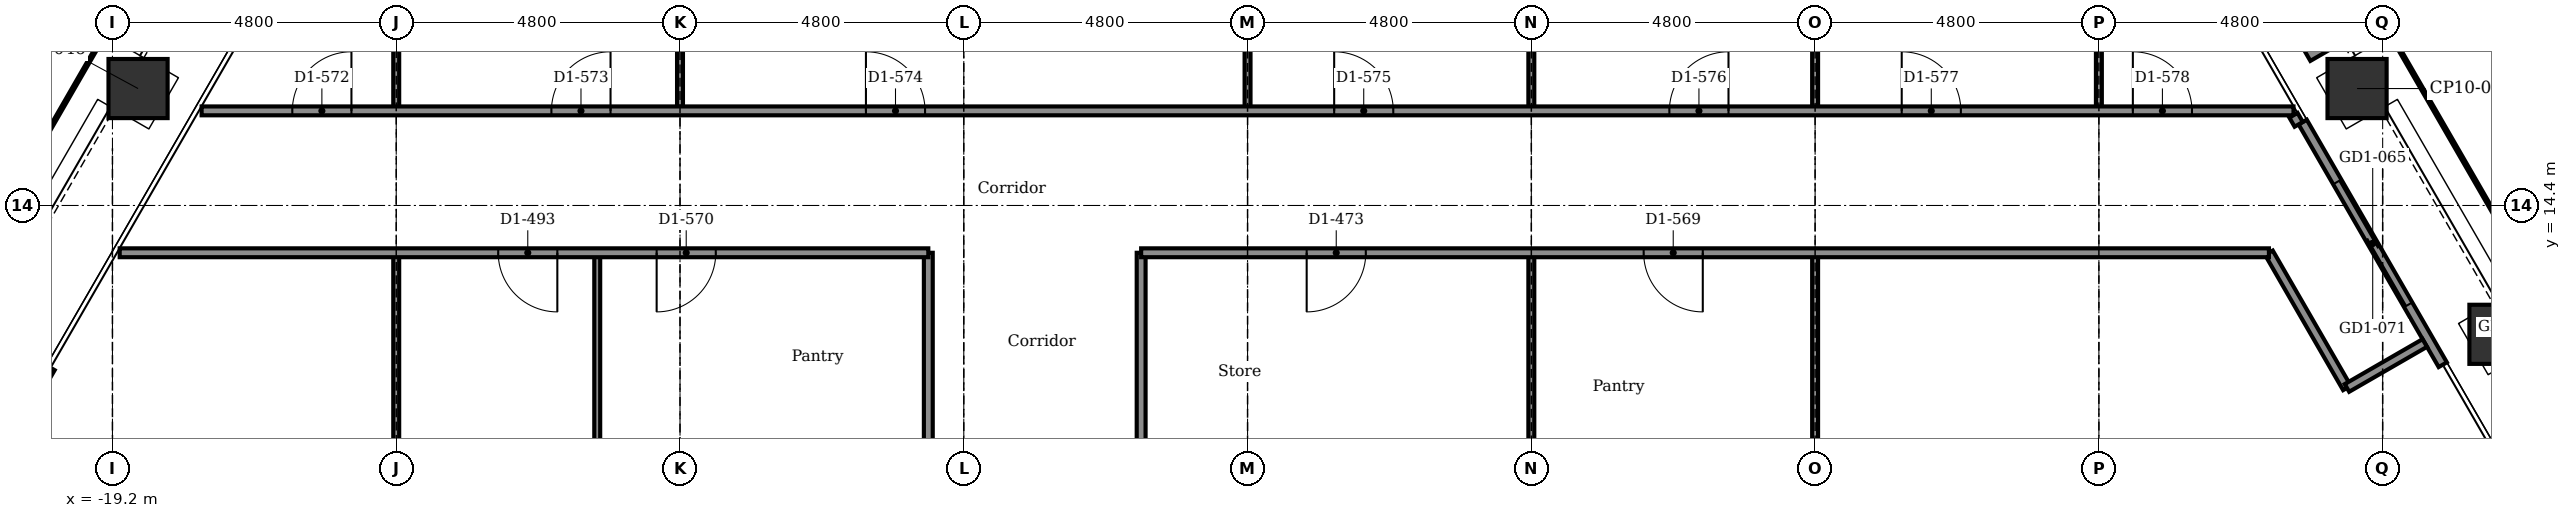
"""IFC4 building model, lengths in metres.
Left out: names, types, materials, properties, quantities, classifications, styles, units other than length and angle.
Written with IfcOpenShell. Run it as: python <this file> out.ifc"""

import sys

from ifc_helpers import new_model, si_unit, direction, frame, frame_2d, origin, origin_2d, place, context, subcontext, project, spatial, rectangle, extrude, element, fill, save


model = new_model("IFC4")
c1 = context("Model", 3, precision=1e-05, world=origin(), true_north=direction((0.0, 1.0)))
c2 = subcontext(c1, "Body", "Model", "MODEL_VIEW")
j1 = project(units=[si_unit("LENGTHUNIT", "METRE"), si_unit("PLANEANGLEUNIT", "RADIAN")], contexts=[c1])
p1 = place(None, origin())
s1 = spatial("IfcSite", under=j1, at=p1, CompositionType="ELEMENT")
p2 = place(p1, origin())
s2 = spatial("IfcBuilding", under=s1, at=p2, CompositionType="ELEMENT")
p3 = place(p2, frame((0.0, 0.0, 201.2)))
s3 = spatial("IfcBuildingStorey", under=s2, at=p3, CompositionType="ELEMENT", Elevation=201.2)
for number, where, z_axis, x_axis in (
    (1, (18.767, 16.378, -0.15), (0.0, 0.0, 1.0), (0.866, 0.5, 0.0)),
    (2, (21.167, 12.221, -0.15), (0.0, 0.0, 1.0), (0.866, 0.5, 0.0)),
    (3, (-18.767, 16.378, -0.15), (0.0, 0.0, 1.0), (0.5, 0.866, 0.0)),
):
    element("IfcColumn", number, at=place(p3, frame(where, z_axis=z_axis, x_axis=x_axis)), inside=s3, PredefinedType="COLUMN", context=c2, shape_type="SweptSolid", body=[
        extrude(rectangle(XDim=1.0, YDim=1.0, at=origin_2d()), origin(), (0.0, 0.0, 1.0), 3.9),
    ])
p4 = place(p3, frame((17.847, 15.812, 0.0), z_axis=(0.0, 0.0, 1.0), x_axis=(0.5000167099, -0.866015756104, 0.0)))
e4 = element("IfcWall", 4, at=p4, inside=s3, PredefinedType="PARTITIONING", context=c2, shape_type="SweptSolid", body=[
    extrude(rectangle(XDim=4.74, YDim=0.16, at=frame_2d((2.37, 0.0))), origin(), (0.0, 0.0, 1.0), 3.75),
])
p5 = place(p4, frame((1.17, 0.0, 0.0)))
e5 = element("IfcOpeningElement", 5, at=p5, cuts=e4, PredefinedType="OPENING", context=c2, shape_type="SweptSolid", body=[
    extrude(rectangle(XDim=2.4, YDim=2.4, at=frame_2d((1.2, 1.2))), frame((0.0, 0.09, 0.0), z_axis=(0.0, -1.0, 0.0), x_axis=(1.0, 0.0, 0.0)), (0.0, 0.0, 1.0), 0.18),
])
p6 = place(p3, frame((-22.617, 7.55, 0.0), z_axis=(0.0, 0.0, 1.0), x_axis=(0.5000167099, 0.866015756104, 0.0)))
e6 = element("IfcWall", 6, at=p6, inside=s3, PredefinedType="PARTITIONING", context=c2, shape_type="SweptSolid", body=[
    extrude(rectangle(XDim=4.74, YDim=0.16, at=frame_2d((2.37, 0.0))), origin(), (0.0, 0.0, 1.0), 3.75),
])
p7 = place(p6, frame((1.17, 0.0, 0.0)))
e7 = element("IfcOpeningElement", 7, at=p7, cuts=e6, PredefinedType="OPENING", context=c2, shape_type="SweptSolid", body=[
    extrude(rectangle(XDim=2.4, YDim=2.4, at=frame_2d((1.2, 1.2))), frame((0.0, 0.09, 0.0), z_axis=(0.0, -1.0, 0.0), x_axis=(1.0, 0.0, 0.0)), (0.0, 0.0, 1.0), 0.18),
])
p8 = place(p3, frame((16.637, 19.767, 0.0), z_axis=(0.0, 0.0, 1.0), x_axis=(0.500028443584, -0.866008981251, 0.0)))
e8 = element("IfcWall", 8, at=p8, inside=s3, PredefinedType="USERDEFINED", context=c2, shape_type="SweptSolid", body=[
    extrude(rectangle(XDim=3.2, YDim=0.6, at=frame_2d((1.6, 0.0))), origin(), (0.0, 0.0, 1.0), 0.7),
])
p9 = place(p3, frame((14.4, 16.0, 0.0), z_axis=(0.0, 0.0, 1.0), x_axis=(0.0, 1.0, 0.0)))
e9 = element("IfcWall", 9, at=p9, inside=s3, PredefinedType="PARTITIONING", context=c2, shape_type="SweptSolid", body=[
    extrude(rectangle(XDim=5.701, YDim=0.1, at=frame_2d((2.851, 0.0))), origin(), (0.0, 0.0, 1.0), 3.066),
])
p10 = place(p3, frame((9.6, 9.95, 0.0), z_axis=(0.0, 0.0, 1.0), x_axis=(0.0, 1.0, 0.0)))
e10 = element("IfcWall", 10, at=p10, inside=s3, PredefinedType="PARTITIONING", context=c2, shape_type="SweptSolid", body=[
    extrude(rectangle(XDim=3.65, YDim=0.1, at=frame_2d((1.825, 0.0))), origin(), (0.0, 0.0, 1.0), 3.066),
])
p11 = place(p3, frame((9.6, 16.0, 0.0), z_axis=(0.0, 0.0, 1.0), x_axis=(0.0, 1.0, 0.0)))
e11 = element("IfcWall", 11, at=p11, inside=s3, PredefinedType="PARTITIONING", context=c2, shape_type="SweptSolid", body=[
    extrude(rectangle(XDim=7.271, YDim=0.1, at=frame_2d((3.636, 0.0))), origin(), (0.0, 0.0, 1.0), 3.066),
])
p12 = place(p3, frame((4.8, 9.95, 0.0), z_axis=(0.0, 0.0, 1.0), x_axis=(0.0, 1.0, 0.0)))
e12 = element("IfcWall", 12, at=p12, inside=s3, PredefinedType="PARTITIONING", context=c2, shape_type="SweptSolid", body=[
    extrude(rectangle(XDim=3.65, YDim=0.1, at=frame_2d((1.825, 0.0))), origin(), (0.0, 0.0, 1.0), 3.066),
])
p13 = place(p3, frame((4.8, 16.0, 0.0), z_axis=(0.0, 0.0, 1.0), x_axis=(0.0, 1.0, 0.0)))
e13 = element("IfcWall", 13, at=p13, inside=s3, PredefinedType="PARTITIONING", context=c2, shape_type="SweptSolid", body=[
    extrude(rectangle(XDim=7.271, YDim=0.1, at=frame_2d((3.636, 0.0))), origin(), (0.0, 0.0, 1.0), 3.066),
])
p14 = place(p3, frame((0.0, 16.0, 0.0), z_axis=(0.0, 0.0, 1.0), x_axis=(0.0, 1.0, 0.0)))
e14 = element("IfcWall", 14, at=p14, inside=s3, PredefinedType="PARTITIONING", context=c2, shape_type="SweptSolid", body=[
    extrude(rectangle(XDim=7.281, YDim=0.1, at=frame_2d((3.641, 0.0))), origin(), (0.0, 0.0, 1.0), 3.066),
])
p15 = place(p3, frame((-1.8, 9.95, 0.0), z_axis=(0.0, 0.0, 1.0), x_axis=(0.0, 1.0, 0.0)))
e15 = element("IfcWall", 15, at=p15, inside=s3, PredefinedType="PARTITIONING", context=c2, shape_type="SweptSolid", body=[
    extrude(rectangle(XDim=3.65, YDim=0.15, at=frame_2d((1.825, 0.0))), origin(), (0.0, 0.0, 1.0), 3.75),
])
p16 = place(p3, frame((-5.4, 10.15, 0.0), z_axis=(0.0, 0.0, 1.0), x_axis=(0.0, 1.0, 0.0)))
e16 = element("IfcWall", 16, at=p16, inside=s3, PredefinedType="PARTITIONING", context=c2, shape_type="SweptSolid", body=[
    extrude(rectangle(XDim=3.45, YDim=0.15, at=frame_2d((1.725, 0.0))), origin(), (0.0, 0.0, 1.0), 3.75),
])
p17 = place(p3, frame((-9.6, 16.0, 0.0), z_axis=(0.0, 0.0, 1.0), x_axis=(0.0, 1.0, 0.0)))
e17 = element("IfcWall", 17, at=p17, inside=s3, PredefinedType="PARTITIONING", context=c2, shape_type="SweptSolid", body=[
    extrude(rectangle(XDim=7.271, YDim=0.1, at=frame_2d((3.636, 0.0))), origin(), (0.0, 0.0, 1.0), 3.066),
])
p18 = place(p3, frame((-11.0, 10.0, 0.0), z_axis=(0.0, 0.0, 1.0), x_axis=(0.0, 1.0, 0.0)))
e18 = element("IfcWall", 18, at=p18, inside=s3, PredefinedType="PARTITIONING", context=c2, shape_type="SweptSolid", body=[
    extrude(rectangle(XDim=3.6, YDim=0.1, at=frame_2d((1.8, 0.0))), origin(), (0.0, 0.0, 1.0), 3.75),
])
p19 = place(p3, frame((-14.4, 9.694, 0.0), z_axis=(0.0, 0.0, 1.0), x_axis=(0.0, 1.0, 0.0)))
e19 = element("IfcWall", 19, at=p19, inside=s3, PredefinedType="PARTITIONING", context=c2, shape_type="SweptSolid", body=[
    extrude(rectangle(XDim=3.906, YDim=0.1, at=frame_2d((1.953, 0.0))), origin(), (0.0, 0.0, 1.0), 3.066),
])
p20 = place(p3, frame((-14.4, 16.0, 0.0), z_axis=(0.0, 0.0, 1.0), x_axis=(0.0, 1.0, 0.0)))
e20 = element("IfcWall", 20, at=p20, inside=s3, PredefinedType="PARTITIONING", context=c2, shape_type="SweptSolid", body=[
    extrude(rectangle(XDim=5.701, YDim=0.1, at=frame_2d((2.851, 0.0))), origin(), (0.0, 0.0, 1.0), 3.066),
])
p21 = place(p3, frame((17.276, 13.6, 0.0), z_axis=(0.0, 0.0, 1.0), x_axis=(0.499938597367, -0.866060851709, 0.0)))
e21 = element("IfcWall", 21, at=p21, inside=s3, PredefinedType="PARTITIONING", context=c2, shape_type="SweptSolid", body=[
    extrude(rectangle(XDim=2.64, YDim=0.15, at=frame_2d((1.32, 0.0))), origin(), (0.0, 0.0, 1.0), 3.75),
])
p22 = place(p3, frame((18.596, 11.314, 0.0), z_axis=(0.0, 0.0, 1.0), x_axis=(0.866030456496, 0.499991248344, 0.0)))
e22 = element("IfcWall", 22, at=p22, inside=s3, PredefinedType="PARTITIONING", context=c2, shape_type="SweptSolid", body=[
    extrude(rectangle(XDim=1.52, YDim=0.15, at=frame_2d((0.76, 0.0))), origin(), (0.0, 0.0, 1.0), 3.75),
])
p23 = place(p3, frame((-19.077, 13.6, 0.0), z_axis=(0.0, 0.0, 1.0), x_axis=(1.0, 0.0, 0.0)))
e23 = element("IfcWall", 23, at=p23, inside=s3, PredefinedType="PARTITIONING", context=c2, shape_type="SweptSolid", body=[
    extrude(rectangle(XDim=13.677, YDim=0.15, at=frame_2d((6.839, 0.0))), origin(), (0.0, 0.0, 1.0), 3.75),
])
p24 = place(p23, frame((9.083, 0.0, 0.0)))
e24 = element("IfcOpeningElement", 24, at=p24, cuts=e23, PredefinedType="OPENING", context=c2, shape_type="SweptSolid", body=[
    extrude(rectangle(XDim=1.0, YDim=2.1, at=frame_2d((0.5, 1.05))), frame((0.0, 0.085, 0.0), z_axis=(0.0, -1.0, 0.0), x_axis=(1.0, 0.0, 0.0)), (0.0, 0.0, 1.0), 0.17),
])
p25 = place(p23, frame((6.402, 0.0, 0.0)))
e25 = element("IfcOpeningElement", 25, at=p25, cuts=e23, PredefinedType="OPENING", context=c2, shape_type="SweptSolid", body=[
    extrude(rectangle(XDim=1.0, YDim=2.1, at=frame_2d((0.5, 1.05))), frame((0.0, 0.085, 0.0), z_axis=(0.0, -1.0, 0.0), x_axis=(1.0, 0.0, 0.0)), (0.0, 0.0, 1.0), 0.17),
])
p26 = place(p3, frame((-1.8, 13.6, 0.0), z_axis=(0.0, 0.0, 1.0), x_axis=(1.0, 0.0, 0.0)))
e26 = element("IfcWall", 26, at=p26, inside=s3, PredefinedType="PARTITIONING", context=c2, shape_type="SweptSolid", body=[
    extrude(rectangle(XDim=19.076, YDim=0.15, at=frame_2d((9.538, 0.0))), origin(), (0.0, 0.0, 1.0), 3.75),
])
p27 = place(p26, frame((2.8, 0.0, 0.0)))
e27 = element("IfcOpeningElement", 27, at=p27, cuts=e26, PredefinedType="OPENING", context=c2, shape_type="SweptSolid", body=[
    extrude(rectangle(XDim=1.0, YDim=2.1, at=frame_2d((0.5, 1.05))), frame((0.0, 0.085, 0.0), z_axis=(0.0, -1.0, 0.0), x_axis=(1.0, 0.0, 0.0)), (0.0, 0.0, 1.0), 0.17),
])
p28 = place(p26, frame((8.5, 0.0, 0.0)))
e28 = element("IfcOpeningElement", 28, at=p28, cuts=e26, PredefinedType="OPENING", context=c2, shape_type="SweptSolid", body=[
    extrude(rectangle(XDim=1.0, YDim=2.1, at=frame_2d((0.5, 1.05))), frame((0.0, 0.085, 0.0), z_axis=(0.0, -1.0, 0.0), x_axis=(1.0, 0.0, 0.0)), (0.0, 0.0, 1.0), 0.17),
])
p29 = place(p3, frame((-17.692, 16.0, 0.0), z_axis=(0.0, 0.0, 1.0), x_axis=(1.0, 0.0, 0.0)))
e29 = element("IfcWall", 29, at=p29, inside=s3, PredefinedType="PARTITIONING", context=c2, shape_type="SweptSolid", body=[
    extrude(rectangle(XDim=35.384, YDim=0.15, at=frame_2d((17.692, 0.0))), origin(), (0.0, 0.0, 1.0), 3.75),
])
p30 = place(p29, frame((1.534, 0.0, 0.0)))
e30 = element("IfcOpeningElement", 30, at=p30, cuts=e29, PredefinedType="OPENING", context=c2, shape_type="SweptSolid", body=[
    extrude(rectangle(XDim=1.0, YDim=2.1, at=frame_2d((0.5, 1.05))), frame((0.0, 0.085, 0.0), z_axis=(0.0, -1.0, 0.0), x_axis=(1.0, 0.0, 0.0)), (0.0, 0.0, 1.0), 0.17),
])
p31 = place(p29, frame((5.917, 0.0, 0.0)))
e31 = element("IfcOpeningElement", 31, at=p31, cuts=e29, PredefinedType="OPENING", context=c2, shape_type="SweptSolid", body=[
    extrude(rectangle(XDim=1.0, YDim=2.1, at=frame_2d((0.5, 1.05))), frame((0.0, 0.085, 0.0), z_axis=(0.0, -1.0, 0.0), x_axis=(1.0, 0.0, 0.0)), (0.0, 0.0, 1.0), 0.17),
])
p32 = place(p29, frame((11.237, 0.0, 0.0)))
e32 = element("IfcOpeningElement", 32, at=p32, cuts=e29, PredefinedType="OPENING", context=c2, shape_type="SweptSolid", body=[
    extrude(rectangle(XDim=1.0, YDim=2.1, at=frame_2d((0.5, 1.05))), frame((0.0, 0.085, 0.0), z_axis=(0.0, -1.0, 0.0), x_axis=(1.0, 0.0, 0.0)), (0.0, 0.0, 1.0), 0.17),
])
p33 = place(p29, frame((19.157, 0.0, 0.0)))
e33 = element("IfcOpeningElement", 33, at=p33, cuts=e29, PredefinedType="OPENING", context=c2, shape_type="SweptSolid", body=[
    extrude(rectangle(XDim=1.0, YDim=2.1, at=frame_2d((0.5, 1.05))), frame((0.0, 0.085, 0.0), z_axis=(0.0, -1.0, 0.0), x_axis=(1.0, 0.0, 0.0)), (0.0, 0.0, 1.0), 0.17),
])
p34 = place(p29, frame((24.827, 0.0, 0.0)))
e34 = element("IfcOpeningElement", 34, at=p34, cuts=e29, PredefinedType="OPENING", context=c2, shape_type="SweptSolid", body=[
    extrude(rectangle(XDim=1.0, YDim=2.1, at=frame_2d((0.5, 1.05))), frame((0.0, 0.085, 0.0), z_axis=(0.0, -1.0, 0.0), x_axis=(1.0, 0.0, 0.0)), (0.0, 0.0, 1.0), 0.17),
])
p35 = place(p29, frame((28.757, 0.0, 0.0)))
e35 = element("IfcOpeningElement", 35, at=p35, cuts=e29, PredefinedType="OPENING", context=c2, shape_type="SweptSolid", body=[
    extrude(rectangle(XDim=1.0, YDim=2.1, at=frame_2d((0.5, 1.05))), frame((0.0, 0.085, 0.0), z_axis=(0.0, -1.0, 0.0), x_axis=(1.0, 0.0, 0.0)), (0.0, 0.0, 1.0), 0.17),
])
p36 = place(p29, frame((32.667, 0.0, 0.0)))
e36 = element("IfcOpeningElement", 36, at=p36, cuts=e29, PredefinedType="OPENING", context=c2, shape_type="SweptSolid", body=[
    extrude(rectangle(XDim=1.0, YDim=2.1, at=frame_2d((0.5, 1.05))), frame((0.0, 0.085, 0.0), z_axis=(0.0, -1.0, 0.0), x_axis=(1.0, 0.0, 0.0)), (0.0, 0.0, 1.0), 0.17),
])
p37 = place(p3, frame((17.78, 15.772, 0.0), z_axis=(0.0, 0.0, 1.0), x_axis=(-0.499841654076, 0.866116805547, 0.0)))
e37 = element("IfcWall", 37, at=p37, inside=s3, PredefinedType="PARTITIONING", context=c2, shape_type="SweptSolid", body=[
    extrude(rectangle(XDim=0.177, YDim=0.16, at=frame_2d((0.089, 0.0))), origin(), (0.0, 0.0, 1.0), 3.75),
])
p38 = place(p5, origin())
e38 = element("IfcDoor", 38, at=p38, inside=s3, OperationType="DOUBLE_DOOR_SLIDING", PredefinedType="DOOR", context=c2, shape_type="SweptSolid", body=[
    extrude(rectangle(XDim=2.4, YDim=2.4, at=frame_2d((1.2, 1.2))), frame((0.0, 0.025, 0.0), z_axis=(0.0, -1.0, 0.0), x_axis=(1.0, 0.0, 0.0)), (0.0, 0.0, 1.0), 0.05),
])
fill(e5, e38)
p39 = place(p27, frame((1.0, 0.0, 0.0), z_axis=(0.0, 0.0, 1.0), x_axis=(-1.0, 0.0, 0.0)))
e39 = element("IfcDoor", 39, at=p39, inside=s3, OperationType="SINGLE_SWING_LEFT", PredefinedType="DOOR", context=c2, shape_type="SweptSolid", body=[
    extrude(rectangle(XDim=1.0, YDim=2.1, at=frame_2d((0.5, 1.05))), frame((0.0, 0.025, 0.0), z_axis=(0.0, -1.0, 0.0), x_axis=(1.0, 0.0, 0.0)), (0.0, 0.0, 1.0), 0.05),
])
fill(e27, e39)
p40 = place(p28, frame((1.0, 0.0, 0.0), z_axis=(0.0, 0.0, 1.0), x_axis=(-1.0, 0.0, 0.0)))
e40 = element("IfcDoor", 40, at=p40, inside=s3, OperationType="SINGLE_SWING_RIGHT", PredefinedType="DOOR", context=c2, shape_type="SweptSolid", body=[
    extrude(rectangle(XDim=1.0, YDim=2.1, at=frame_2d((0.5, 1.05))), frame((0.0, 0.025, 0.0), z_axis=(0.0, -1.0, 0.0), x_axis=(1.0, 0.0, 0.0)), (0.0, 0.0, 1.0), 0.05),
])
fill(e28, e40)
p41 = place(p24, frame((1.0, 0.0, 0.0), z_axis=(0.0, 0.0, 1.0), x_axis=(-1.0, 0.0, 0.0)))
e41 = element("IfcDoor", 41, at=p41, inside=s3, OperationType="SINGLE_SWING_LEFT", PredefinedType="DOOR", context=c2, shape_type="SweptSolid", body=[
    extrude(rectangle(XDim=1.0, YDim=2.1, at=frame_2d((0.5, 1.05))), frame((0.0, 0.025, 0.0), z_axis=(0.0, -1.0, 0.0), x_axis=(1.0, 0.0, 0.0)), (0.0, 0.0, 1.0), 0.05),
])
fill(e24, e41)
p42 = place(p30, origin())
e42 = element("IfcDoor", 42, at=p42, inside=s3, OperationType="SINGLE_SWING_RIGHT", PredefinedType="DOOR", context=c2, shape_type="SweptSolid", body=[
    extrude(rectangle(XDim=1.0, YDim=2.1, at=frame_2d((0.5, 1.05))), frame((0.0, 0.025, 0.0), z_axis=(0.0, -1.0, 0.0), x_axis=(1.0, 0.0, 0.0)), (0.0, 0.0, 1.0), 0.05),
])
fill(e30, e42)
p43 = place(p31, origin())
e43 = element("IfcDoor", 43, at=p43, inside=s3, OperationType="SINGLE_SWING_RIGHT", PredefinedType="DOOR", context=c2, shape_type="SweptSolid", body=[
    extrude(rectangle(XDim=1.0, YDim=2.1, at=frame_2d((0.5, 1.05))), frame((0.0, 0.025, 0.0), z_axis=(0.0, -1.0, 0.0), x_axis=(1.0, 0.0, 0.0)), (0.0, 0.0, 1.0), 0.05),
])
fill(e31, e43)
p44 = place(p32, origin())
e44 = element("IfcDoor", 44, at=p44, inside=s3, OperationType="SINGLE_SWING_LEFT", PredefinedType="DOOR", context=c2, shape_type="SweptSolid", body=[
    extrude(rectangle(XDim=1.0, YDim=2.1, at=frame_2d((0.5, 1.05))), frame((0.0, 0.025, 0.0), z_axis=(0.0, -1.0, 0.0), x_axis=(1.0, 0.0, 0.0)), (0.0, 0.0, 1.0), 0.05),
])
fill(e32, e44)
p45 = place(p33, origin())
e45 = element("IfcDoor", 45, at=p45, inside=s3, OperationType="SINGLE_SWING_LEFT", PredefinedType="DOOR", context=c2, shape_type="SweptSolid", body=[
    extrude(rectangle(XDim=1.0, YDim=2.1, at=frame_2d((0.5, 1.05))), frame((0.0, 0.025, 0.0), z_axis=(0.0, -1.0, 0.0), x_axis=(1.0, 0.0, 0.0)), (0.0, 0.0, 1.0), 0.05),
])
fill(e33, e45)
p46 = place(p34, origin())
e46 = element("IfcDoor", 46, at=p46, inside=s3, OperationType="SINGLE_SWING_RIGHT", PredefinedType="DOOR", context=c2, shape_type="SweptSolid", body=[
    extrude(rectangle(XDim=1.0, YDim=2.1, at=frame_2d((0.5, 1.05))), frame((0.0, 0.025, 0.0), z_axis=(0.0, -1.0, 0.0), x_axis=(1.0, 0.0, 0.0)), (0.0, 0.0, 1.0), 0.05),
])
fill(e34, e46)
p47 = place(p35, origin())
e47 = element("IfcDoor", 47, at=p47, inside=s3, OperationType="SINGLE_SWING_LEFT", PredefinedType="DOOR", context=c2, shape_type="SweptSolid", body=[
    extrude(rectangle(XDim=1.0, YDim=2.1, at=frame_2d((0.5, 1.05))), frame((0.0, 0.025, 0.0), z_axis=(0.0, -1.0, 0.0), x_axis=(1.0, 0.0, 0.0)), (0.0, 0.0, 1.0), 0.05),
])
fill(e35, e47)
p48 = place(p36, origin())
e48 = element("IfcDoor", 48, at=p48, inside=s3, OperationType="SINGLE_SWING_LEFT", PredefinedType="DOOR", context=c2, shape_type="SweptSolid", body=[
    extrude(rectangle(XDim=1.0, YDim=2.1, at=frame_2d((0.5, 1.05))), frame((0.0, 0.025, 0.0), z_axis=(0.0, -1.0, 0.0), x_axis=(1.0, 0.0, 0.0)), (0.0, 0.0, 1.0), 0.05),
])
fill(e36, e48)
p49 = place(p25, frame((1.0, 0.0, 0.0), z_axis=(0.0, 0.0, 1.0), x_axis=(-1.0, 0.0, 0.0)))
e49 = element("IfcDoor", 49, at=p49, inside=s3, OperationType="SINGLE_SWING_RIGHT", PredefinedType="DOOR", context=c2, shape_type="SweptSolid", body=[
    extrude(rectangle(XDim=1.0, YDim=2.1, at=frame_2d((0.5, 1.05))), frame((0.0, 0.025, 0.0), z_axis=(0.0, -1.0, 0.0), x_axis=(1.0, 0.0, 0.0)), (0.0, 0.0, 1.0), 0.05),
])
fill(e25, e49)
save(model, sys.argv[1])
